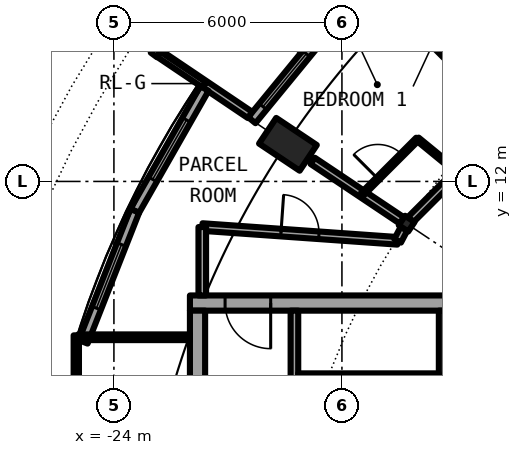
"""IFC4 building model, lengths in metres.
Left out: names, types, materials, properties, quantities, classifications, styles, units other than length and angle.
Written with IfcOpenShell. Run it as: python <this file> out.ifc"""

import sys

from ifc_helpers import new_model, si_unit, direction, frame, frame_2d, origin, origin_2d, place, context, subcontext, project, spatial, rectangle, circle, hollow_circle, i_section, extrude, element, fill, save


model = new_model("IFC4")
c1 = context("Model", 3, precision=1e-05, world=origin(), true_north=direction((0.0, 1.0)))
c2 = subcontext(c1, "Body", "Model", "MODEL_VIEW")
j1 = project(units=[si_unit("LENGTHUNIT", "METRE"), si_unit("PLANEANGLEUNIT", "RADIAN")], contexts=[c1])
p1 = place(None, origin())
s1 = spatial("IfcSite", under=j1, at=p1, CompositionType="ELEMENT")
p2 = place(p1, origin())
s2 = spatial("IfcBuilding", under=s1, at=p2, CompositionType="ELEMENT")
p3 = place(p2, frame((0.0, 0.0, 246.25)))
s3 = spatial("IfcBuildingStorey", under=s2, at=p3, CompositionType="ELEMENT", Elevation=246.25)
p4 = place(p3, frame((-19.955, 13.334, 0.0), z_axis=(0.346819263352, -0.231767499499, 0.908845545043), x_axis=(0.555620411262, 0.831436082083, 0.0)))
e1 = element("IfcColumn", 1, at=p4, inside=s3, PredefinedType="COLUMN", context=c2, shape_type="SweptSolid", body=[
    extrude(hollow_circle(Radius=0.406, WallThickness=0.03, at=origin_2d()), origin(), (0.0, 0.0, 1.0), 3.081),
])
p5 = place(p3, frame((-16.297, 10.889, 0.0), z_axis=(0.0, 0.0, 1.0), x_axis=(-0.831469612303, 0.55557023302, 0.0)))
e2 = element("IfcColumn", 2, at=p5, inside=s3, PredefinedType="COLUMN", context=c2, shape_type="SweptSolid", body=[
    extrude(i_section(OverallWidth=0.3, OverallDepth=0.3, WebThickness=0.011, FlangeThickness=0.019, FilletRadius=0.027, at=origin_2d()), origin(), (0.0, 0.0, 1.0), 3.05),
])
p6 = place(p3, frame((-17.324, 17.324, 0.0), z_axis=(0.0, 0.0, 1.0), x_axis=(-0.634396836208, -0.773007538262, 0.0)))
e3 = element("IfcWall", 3, at=p6, inside=s3, PredefinedType="SOLIDWALL", context=c2, shape_type="SweptSolid", body=[
    extrude(rectangle(XDim=4.803, YDim=0.25, at=frame_2d((2.402, 0.0))), origin(), (0.0, 0.0, 1.0), 2.7),
])
p7 = place(p6, frame((0.704, 0.0, 0.0)))
e4 = element("IfcOpeningElement", 4, at=p7, cuts=e3, PredefinedType="OPENING", context=c2, shape_type="SweptSolid", body=[
    extrude(rectangle(XDim=1.0, YDim=2.2, at=frame_2d((0.5, 1.1))), frame((0.0, 0.135, 0.0), z_axis=(0.0, -1.0, 0.0), x_axis=(1.0, 0.0, 0.0)), (0.0, 0.0, 1.0), 0.27),
])
p8 = place(p6, frame((2.542, 0.0, 0.3)))
e5 = element("IfcOpeningElement", 5, at=p8, cuts=e3, PredefinedType="OPENING", context=c2, shape_type="SweptSolid", body=[
    extrude(rectangle(XDim=1.8, YDim=2.1, at=frame_2d((0.9, 1.05))), frame((0.0, 0.135, 0.0), z_axis=(0.0, -1.0, 0.0), x_axis=(1.0, 0.0, 0.0)), (0.0, 0.0, 1.0), 0.27),
])
p9 = place(p3, frame((-21.332, 17.513, -0.03), z_axis=(0.0, 0.0, 1.0), x_axis=(-0.59569365177, -0.803211723794, 0.0)))
e6 = element("IfcWall", 6, at=p9, inside=s3, PredefinedType="SOLIDWALL", context=c2, shape_type="SweptSolid", body=[
    extrude(rectangle(XDim=2.718, YDim=0.2, at=frame_2d((1.359, 0.0))), origin(), (0.0, 0.0, 1.0), 2.73),
])
p10 = place(p9, frame((0.319, 0.0, 0.33)))
e7 = element("IfcOpeningElement", 7, at=p10, cuts=e6, PredefinedType="OPENING", context=c2, shape_type="SweptSolid", body=[
    extrude(circle(Radius=1.04, at=frame_2d((1.04, 1.04))), frame((0.0, 0.11, 0.0), z_axis=(0.0, -1.0, 0.0), x_axis=(1.0, 0.0, 0.0)), (0.0, 0.0, 1.0), 0.22),
])
p11 = place(p3, frame((-20.419, 13.75, -0.03), z_axis=(0.0, 0.0, 1.0), x_axis=(-0.829211810515, 0.558934498222, 0.0)))
e8 = element("IfcWall", 8, at=p11, inside=s3, PredefinedType="SOLIDWALL", context=c2, shape_type="SweptSolid", body=[
    extrude(rectangle(XDim=2.882, YDim=0.2, at=frame_2d((1.441, 0.0))), origin(), (0.0, 0.0, 1.0), 2.73),
])
p12 = place(p3, frame((-21.618, 14.445, 0.0), z_axis=(0.0, 0.0, 1.0), x_axis=(-0.495031435966, -0.868875064325, 0.0)))
e9 = element("IfcWall", 9, at=p12, inside=s3, PredefinedType="SOLIDWALL", context=c2, shape_type="SweptSolid", body=[
    extrude(rectangle(XDim=3.705, YDim=0.25, at=frame_2d((1.853, 0.0))), origin(), (0.0, 0.0, 1.0), 2.7),
])
p13 = place(p12, frame((0.952, 0.0, 0.3)))
e10 = element("IfcOpeningElement", 10, at=p13, cuts=e9, PredefinedType="OPENING", context=c2, shape_type="SweptSolid", body=[
    extrude(rectangle(XDim=1.8, YDim=2.1, at=frame_2d((0.9, 1.05))), frame((0.0, 0.135, 0.0), z_axis=(0.0, -1.0, 0.0), x_axis=(1.0, 0.0, 0.0)), (0.0, 0.0, 1.0), 0.27),
])
p14 = place(p3, frame((-23.452, 11.226, 0.0), z_axis=(0.0, 0.0, 1.0), x_axis=(-0.366351636034, -0.930476479432, 0.0)))
e11 = element("IfcWall", 11, at=p14, inside=s3, PredefinedType="SOLIDWALL", context=c2, shape_type="SweptSolid", body=[
    extrude(rectangle(XDim=3.705, YDim=0.25, at=frame_2d((1.852, 0.0))), origin(), (0.0, 0.0, 1.0), 2.7),
])
p15 = place(p14, frame((0.952, 0.0, 0.3)))
e12 = element("IfcOpeningElement", 12, at=p15, cuts=e11, PredefinedType="OPENING", context=c2, shape_type="SweptSolid", body=[
    extrude(rectangle(XDim=1.8, YDim=2.1, at=frame_2d((0.9, 1.05))), frame((0.0, 0.135, 0.0), z_axis=(0.0, -1.0, 0.0), x_axis=(1.0, 0.0, 0.0)), (0.0, 0.0, 1.0), 0.27),
])
p16 = place(p3, frame((-8.6, 8.8, 0.0), z_axis=(0.0, 0.0, 1.0), x_axis=(-1.0, 0.0, 0.0)))
e13 = element("IfcWall", 13, at=p16, inside=s3, PredefinedType="SHEAR", context=c2, shape_type="SweptSolid", body=[
    extrude(rectangle(XDim=13.4, YDim=0.4, at=frame_2d((6.7, 0.0))), origin(), (0.0, 0.0, 1.0), 3.05),
])
p17 = place(p16, frame((11.275, 0.0, 0.0)))
e14 = element("IfcOpeningElement", 14, at=p17, cuts=e13, PredefinedType="OPENING", context=c2, shape_type="SweptSolid", body=[
    extrude(rectangle(XDim=1.2, YDim=2.3, at=frame_2d((0.6, 1.15))), frame((0.0, 0.21, 0.0), z_axis=(0.0, -1.0, 0.0), x_axis=(1.0, 0.0, 0.0)), (0.0, 0.0, 1.0), 0.42),
])
p18 = place(p3, frame((-21.8, -8.6, 0.0), z_axis=(0.0, 0.0, 1.0), x_axis=(0.0, 1.0, 0.0)))
e15 = element("IfcWall", 15, at=p18, inside=s3, PredefinedType="SHEAR", context=c2, shape_type="SweptSolid", body=[
    extrude(rectangle(XDim=17.2, YDim=0.4, at=frame_2d((8.6, 0.0))), origin(), (0.0, 0.0, 1.0), 3.05),
])
p19 = place(p18, frame((7.7, 0.0, 0.0)))
e16 = element("IfcOpeningElement", 16, at=p19, cuts=e15, PredefinedType="OPENING", context=c2, shape_type="SweptSolid", body=[
    extrude(rectangle(XDim=1.8, YDim=2.3, at=frame_2d((0.9, 1.15))), frame((0.0, 0.21, 0.0), z_axis=(0.0, -1.0, 0.0), x_axis=(1.0, 0.0, 0.0)), (0.0, 0.0, 1.0), 0.42),
])
p20 = place(p3, frame((-15.325, 8.6, 0.0), z_axis=(0.0, 0.0, 1.0), x_axis=(0.0, -1.0, 0.0)))
e17 = element("IfcWall", 17, at=p20, inside=s3, PredefinedType="SHEAR", context=c2, shape_type="SweptSolid", body=[
    extrude(rectangle(XDim=3.95, YDim=0.25, at=frame_2d((1.975, 0.0))), origin(), (0.0, 0.0, 1.0), 3.05),
])
p21 = place(p20, frame((2.025, 0.0, 0.0)))
e18 = element("IfcOpeningElement", 18, at=p21, cuts=e17, PredefinedType="OPENING", context=c2, shape_type="SweptSolid", body=[
    extrude(rectangle(XDim=1.2, YDim=2.3, at=frame_2d((0.6, 1.15))), frame((0.0, 0.135, 0.0), z_axis=(0.0, -1.0, 0.0), x_axis=(1.0, 0.0, 0.0)), (0.0, 0.0, 1.0), 0.27),
])
p22 = place(p3, frame((-19.25, 8.6, 0.0), z_axis=(0.0, 0.0, 1.0), x_axis=(0.0, -1.0, 0.0)))
e19 = element("IfcWall", 19, at=p22, inside=s3, PredefinedType="SOLIDWALL", context=c2, shape_type="SweptSolid", body=[
    extrude(rectangle(XDim=7.025, YDim=0.2, at=frame_2d((3.513, 0.0))), origin(), (0.0, 0.0, 1.0), 2.7),
])
p23 = place(p22, frame((2.35, 0.0, 0.0)))
e20 = element("IfcOpeningElement", 20, at=p23, cuts=e19, PredefinedType="OPENING", context=c2, shape_type="SweptSolid", body=[
    extrude(rectangle(XDim=1.1, YDim=2.3, at=frame_2d((0.55, 1.15))), frame((0.0, 0.11, 0.0), z_axis=(0.0, -1.0, 0.0), x_axis=(1.0, 0.0, 0.0)), (0.0, 0.0, 1.0), 0.22),
])
p24 = place(p3, frame((-15.45, 6.875, 0.0), z_axis=(0.0, 0.0, 1.0), x_axis=(-1.0, 0.0, 0.0)))
e21 = element("IfcWall", 21, at=p24, inside=s3, PredefinedType="PARTITIONING", context=c2, shape_type="SweptSolid", body=[
    extrude(rectangle(XDim=3.7, YDim=0.15, at=frame_2d((1.85, 0.0))), origin(), (0.0, 0.0, 1.0), 2.7),
])
p25 = place(p24, frame((1.4, 0.0, 0.0)))
e22 = element("IfcOpeningElement", 22, at=p25, cuts=e21, PredefinedType="OPENING", context=c2, shape_type="SweptSolid", body=[
    extrude(rectangle(XDim=0.9, YDim=2.3, at=frame_2d((0.45, 1.15))), frame((0.0, 0.085, 0.0), z_axis=(0.0, -1.0, 0.0), x_axis=(1.0, 0.0, 0.0)), (0.0, 0.0, 1.0), 0.17),
])
p26 = place(p3, frame((-22.0, 7.9, 0.0), z_axis=(0.0, 0.0, 1.0), x_axis=(-1.0, 0.0, 0.0)))
e23 = element("IfcWall", 23, at=p26, inside=s3, PredefinedType="PARTITIONING", context=c2, shape_type="SweptSolid", body=[
    extrude(rectangle(XDim=2.94, YDim=0.15, at=frame_2d((1.47, 0.0))), origin(), (0.0, 0.0, 1.0), 2.7),
])
p27 = place(p3, frame((-25.0, 7.95, 0.0), z_axis=(0.0, 0.0, 1.0), x_axis=(0.0, -1.0, 0.0)))
e24 = element("IfcWall", 24, at=p27, inside=s3, PredefinedType="PARTITIONING", context=c2, shape_type="SweptSolid", body=[
    extrude(rectangle(XDim=15.9, YDim=0.12, at=frame_2d((7.95, 0.0))), origin(), (0.0, 0.0, 1.0), 2.7),
])
p28 = place(p27, frame((0.95, 0.0, 0.1)))
e25 = element("IfcOpeningElement", 25, at=p28, cuts=e24, PredefinedType="OPENING", context=c2, shape_type="SweptSolid", body=[
    extrude(rectangle(XDim=14.0, YDim=2.35, at=frame_2d((7.0, 1.175))), frame((0.0, 0.07, 0.0), z_axis=(0.0, -1.0, 0.0), x_axis=(1.0, 0.0, 0.0)), (0.0, 0.0, 1.0), 0.14),
])
p29 = place(p3, frame((-18.769, 12.541, 0.0), z_axis=(0.0, 0.0, 1.0), x_axis=(0.83131782921, -0.555797325324, 0.0)))
e26 = element("IfcWall", 26, at=p29, inside=s3, PredefinedType="PARTITIONING", context=c2, shape_type="SweptSolid", body=[
    extrude(rectangle(XDim=2.823, YDim=0.2, at=frame_2d((1.412, 0.0))), origin(), (0.0, 0.0, 1.0), 2.7),
])
p30 = place(p3, frame((-17.236, 17.236, 0.0), z_axis=(0.0, 0.0, 1.0), x_axis=(0.707106781187, -0.707106781187, 0.0)))
e27 = element("IfcWall", 27, at=p30, inside=s3, PredefinedType="PARTITIONING", context=c2, shape_type="SweptSolid", body=[
    extrude(rectangle(XDim=3.779, YDim=0.1, at=frame_2d((1.89, 0.0))), origin(), (0.0, 0.0, 1.0), 2.7),
])
p31 = place(p30, frame((1.439, 0.0, 0.0)))
e28 = element("IfcOpeningElement", 28, at=p31, cuts=e27, PredefinedType="OPENING", context=c2, shape_type="SweptSolid", body=[
    extrude(rectangle(XDim=0.9, YDim=2.3, at=frame_2d((0.45, 1.15))), frame((0.0, 0.06, 0.0), z_axis=(0.0, -1.0, 0.0), x_axis=(1.0, 0.0, 0.0)), (0.0, 0.0, 1.0), 0.12),
])
p32 = place(p3, frame((-16.012, 13.115, 0.0), z_axis=(0.0, 0.0, 1.0), x_axis=(0.773562805085, -0.633719643525, 0.0)))
e29 = element("IfcWall", 29, at=p32, inside=s3, PredefinedType="PARTITIONING", context=c2, shape_type="SweptSolid", body=[
    extrude(rectangle(XDim=1.379, YDim=0.1, at=frame_2d((0.689, 0.0))), origin(), (0.0, 0.0, 1.0), 2.7),
])
p33 = place(p3, frame((-21.675, 10.8, 0.0), z_axis=(0.0, 0.0, 1.0), x_axis=(0.997515141784, -0.070452408845, 0.0)))
e30 = element("IfcWall", 30, at=p33, inside=s3, PredefinedType="PARTITIONING", context=c2, shape_type="SweptSolid", body=[
    extrude(rectangle(XDim=5.153, YDim=0.2, at=frame_2d((2.576, 0.0))), origin(), (0.0, 0.0, 1.0), 2.7),
])
p34 = place(p33, frame((2.076, 0.0, 0.0)))
e31 = element("IfcOpeningElement", 31, at=p34, cuts=e30, PredefinedType="OPENING", context=c2, shape_type="SweptSolid", body=[
    extrude(rectangle(XDim=1.0, YDim=2.3, at=frame_2d((0.5, 1.15))), frame((0.0, 0.11, 0.0), z_axis=(0.0, -1.0, 0.0), x_axis=(1.0, 0.0, 0.0)), (0.0, 0.0, 1.0), 0.22),
])
p35 = place(p3, frame((-16.189, 10.997, 0.0), z_axis=(0.0, 0.0, 1.0), x_axis=(0.707106781187, 0.707106781187, 0.0)))
e32 = element("IfcWall", 32, at=p35, inside=s3, PredefinedType="PARTITIONING", context=c2, shape_type="SweptSolid", body=[
    extrude(rectangle(XDim=7.343, YDim=0.2, at=frame_2d((3.671, 0.0))), origin(), (0.0, 0.0, 1.0), 2.45),
])
p36 = place(p35, frame((4.127, 0.0, 0.0)))
e33 = element("IfcOpeningElement", 33, at=p36, cuts=e32, PredefinedType="OPENING", context=c2, shape_type="SweptSolid", body=[
    extrude(rectangle(XDim=1.0, YDim=2.3, at=frame_2d((0.5, 1.15))), frame((0.0, 0.11, 0.0), z_axis=(0.0, -1.0, 0.0), x_axis=(1.0, 0.0, 0.0)), (0.0, 0.0, 1.0), 0.22),
])
p37 = place(p3, frame((-16.535, 10.437, 0.0), z_axis=(0.0, 0.0, 1.0), x_axis=(0.465802239822, 0.884888848035, 0.0)))
e34 = element("IfcWall", 34, at=p37, inside=s3, PredefinedType="PARTITIONING", context=c2, shape_type="SweptSolid", body=[
    extrude(rectangle(XDim=0.361, YDim=0.2, at=frame_2d((0.18, 0.0))), origin(), (0.0, 0.0, 1.0), 2.7),
])
p38 = place(p3, frame((-17.461, 11.667, 0.0), z_axis=(0.0, 0.0, 1.0), x_axis=(0.707345104989, 0.706868377032, 0.0)))
e35 = element("IfcWall", 35, at=p38, inside=s3, PredefinedType="PARTITIONING", context=c2, shape_type="SweptSolid", body=[
    extrude(rectangle(XDim=2.049, YDim=0.1, at=frame_2d((1.024, 0.0))), origin(), (0.0, 0.0, 1.0), 2.7),
])
p39 = place(p38, frame((0.574, 0.0, 0.0)))
e36 = element("IfcOpeningElement", 36, at=p39, cuts=e35, PredefinedType="OPENING", context=c2, shape_type="SweptSolid", body=[
    extrude(rectangle(XDim=0.9, YDim=2.3, at=frame_2d((0.45, 1.15))), frame((0.0, 0.06, 0.0), z_axis=(0.0, -1.0, 0.0), x_axis=(1.0, 0.0, 0.0)), (0.0, 0.0, 1.0), 0.12),
])
p40 = place(p3, frame((-21.675, 9.0, 0.0), z_axis=(0.0, 0.0, 1.0), x_axis=(0.0, 1.0, 0.0)))
e37 = element("IfcWall", 37, at=p40, inside=s3, PredefinedType="PARTITIONING", context=c2, shape_type="SweptSolid", body=[
    extrude(rectangle(XDim=1.8, YDim=0.2, at=frame_2d((0.9, 0.0))), origin(), (0.0, 0.0, 1.0), 2.7),
])
p41 = place(p8, origin())
e38 = element("IfcWindow", 38, at=p41, inside=s3, PartitioningType="SINGLE_PANEL", PredefinedType="WINDOW", context=c2, shape_type="SweptSolid", body=[
    extrude(rectangle(XDim=1.8, YDim=2.1, at=frame_2d((0.9, 1.05))), frame((0.0, 0.03, 0.0), z_axis=(0.0, -1.0, 0.0), x_axis=(1.0, 0.0, 0.0)), (0.0, 0.0, 1.0), 0.06),
])
fill(e5, e38)
p42 = place(p13, origin())
e39 = element("IfcWindow", 39, at=p42, inside=s3, PartitioningType="SINGLE_PANEL", PredefinedType="WINDOW", context=c2, shape_type="SweptSolid", body=[
    extrude(rectangle(XDim=1.8, YDim=2.1, at=frame_2d((0.9, 1.05))), frame((0.0, 0.03, 0.0), z_axis=(0.0, -1.0, 0.0), x_axis=(1.0, 0.0, 0.0)), (0.0, 0.0, 1.0), 0.06),
])
fill(e10, e39)
p43 = place(p15, origin())
e40 = element("IfcWindow", 40, at=p43, inside=s3, PartitioningType="SINGLE_PANEL", PredefinedType="WINDOW", context=c2, shape_type="SweptSolid", body=[
    extrude(rectangle(XDim=1.8, YDim=2.1, at=frame_2d((0.9, 1.05))), frame((0.0, 0.03, 0.0), z_axis=(0.0, -1.0, 0.0), x_axis=(1.0, 0.0, 0.0)), (0.0, 0.0, 1.0), 0.06),
])
fill(e12, e40)
p44 = place(p25, origin())
e41 = element("IfcDoor", 41, at=p44, inside=s3, OperationType="SINGLE_SWING_LEFT", PredefinedType="DOOR", context=c2, shape_type="SweptSolid", body=[
    extrude(rectangle(XDim=0.9, YDim=2.3, at=frame_2d((0.45, 1.15))), frame((0.0, 0.025, 0.0), z_axis=(0.0, -1.0, 0.0), x_axis=(1.0, 0.0, 0.0)), (0.0, 0.0, 1.0), 0.05),
])
fill(e22, e41)
p45 = place(p17, origin())
e42 = element("IfcDoor", 42, at=p45, inside=s3, OperationType="SINGLE_SWING_LEFT", PredefinedType="DOOR", context=c2, shape_type="SweptSolid", body=[
    extrude(rectangle(XDim=1.2, YDim=2.3, at=frame_2d((0.6, 1.15))), frame((0.0, 0.025, 0.0), z_axis=(0.0, -1.0, 0.0), x_axis=(1.0, 0.0, 0.0)), (0.0, 0.0, 1.0), 0.05),
])
fill(e14, e42)
p46 = place(p28, origin())
e43 = element("IfcWindow", 43, at=p46, inside=s3, PartitioningType="SINGLE_PANEL", PredefinedType="WINDOW", context=c2, shape_type="SweptSolid", body=[
    extrude(rectangle(XDim=14.0, YDim=2.35, at=frame_2d((7.0, 1.175))), frame((0.0, 0.03, 0.0), z_axis=(0.0, -1.0, 0.0), x_axis=(1.0, 0.0, 0.0)), (0.0, 0.0, 1.0), 0.06),
])
fill(e25, e43)
p47 = place(p39, origin())
e44 = element("IfcDoor", 44, at=p47, inside=s3, OperationType="SINGLE_SWING_LEFT", PredefinedType="DOOR", context=c2, shape_type="SweptSolid", body=[
    extrude(rectangle(XDim=0.9, YDim=2.3, at=frame_2d((0.45, 1.15))), frame((0.0, 0.025, 0.0), z_axis=(0.0, -1.0, 0.0), x_axis=(1.0, 0.0, 0.0)), (0.0, 0.0, 1.0), 0.05),
])
fill(e36, e44)
p48 = place(p34, origin())
e45 = element("IfcDoor", 45, at=p48, inside=s3, OperationType="SINGLE_SWING_RIGHT", PredefinedType="DOOR", context=c2, shape_type="SweptSolid", body=[
    extrude(rectangle(XDim=1.0, YDim=2.3, at=frame_2d((0.5, 1.15))), frame((0.0, 0.025, 0.0), z_axis=(0.0, -1.0, 0.0), x_axis=(1.0, 0.0, 0.0)), (0.0, 0.0, 1.0), 0.05),
])
fill(e31, e45)
save(model, sys.argv[1])
